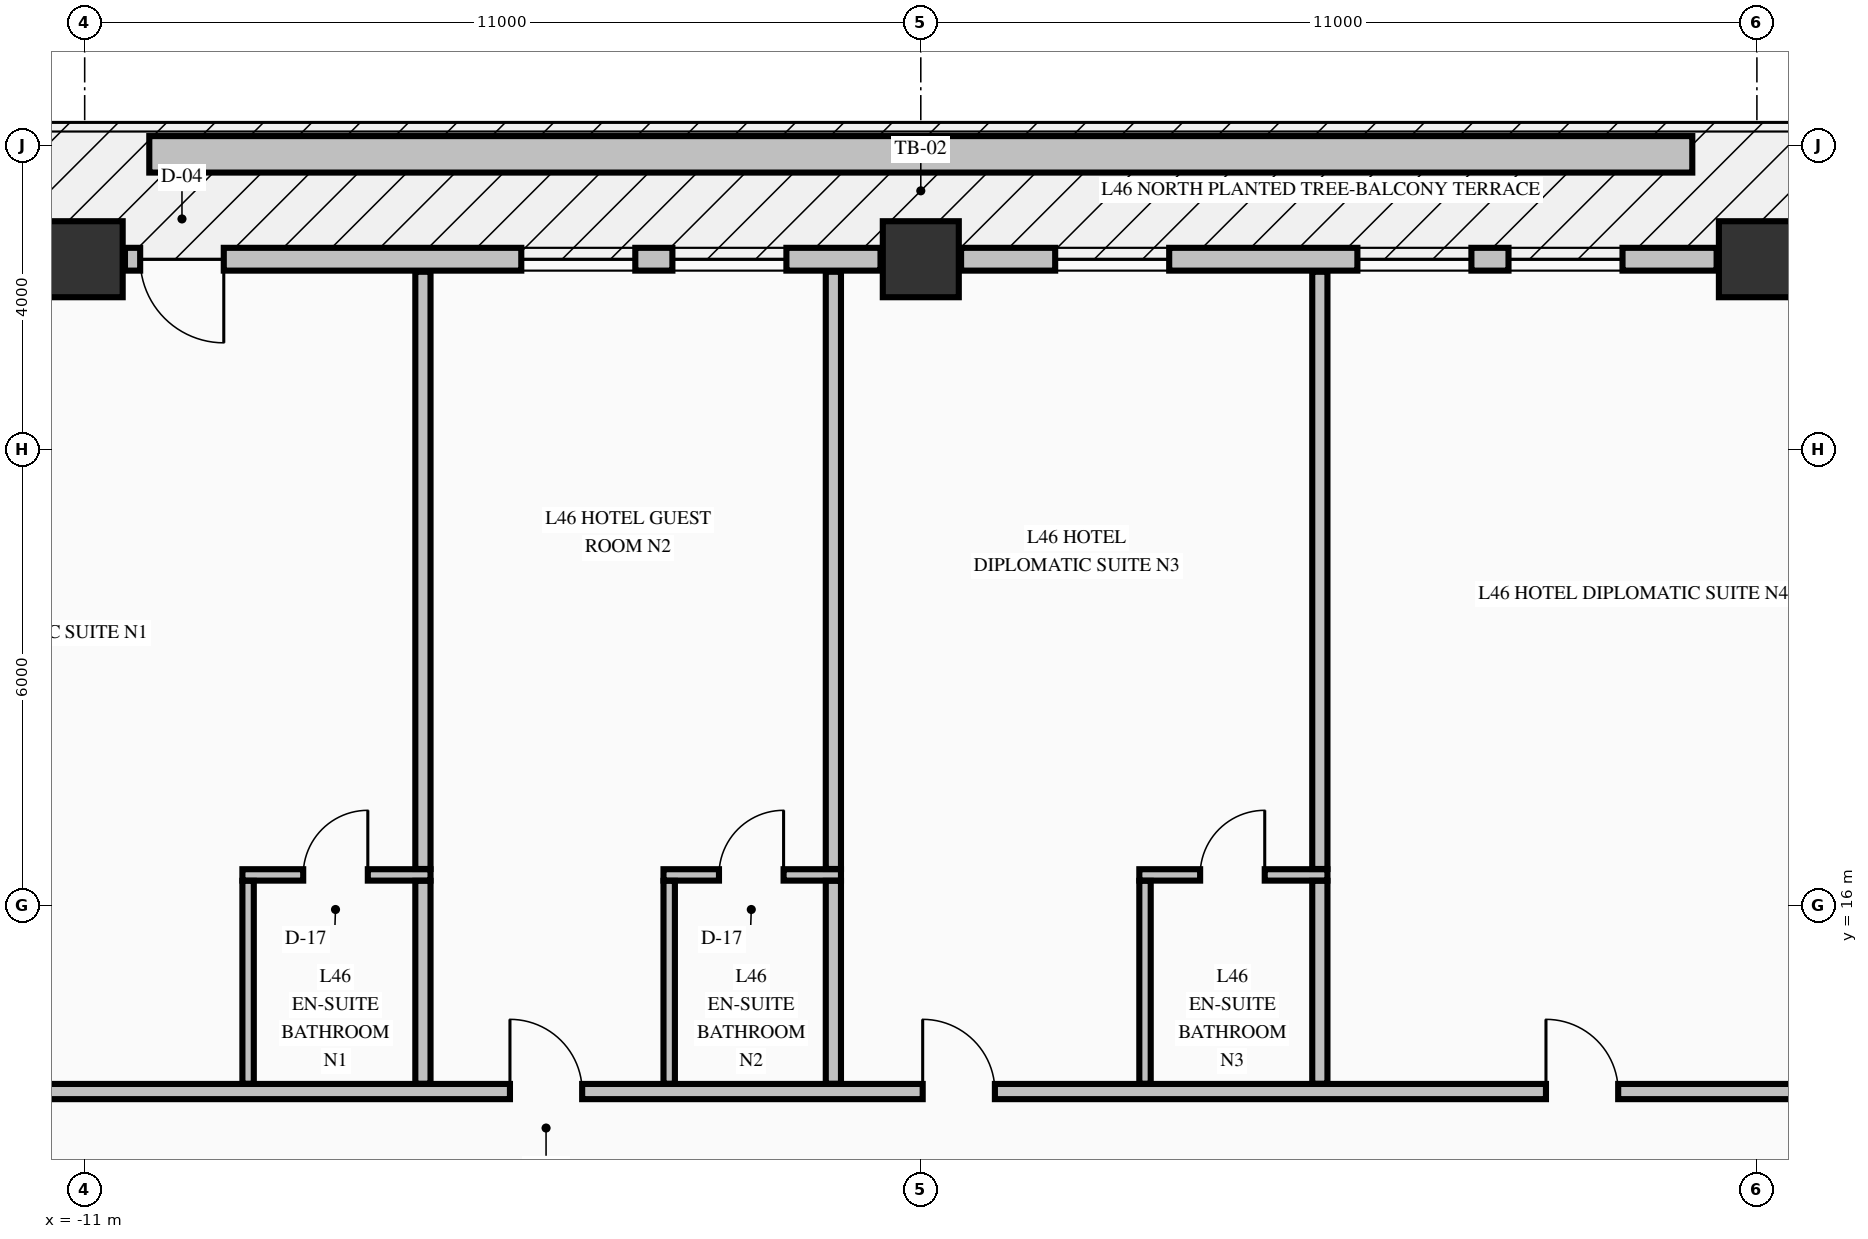
"""IFC4 building model, lengths in metres.
Left out: names, types, materials, properties, quantities, classifications, styles, units other than length and angle.
Written with IfcOpenShell. Run it as: python <this file> out.ifc"""

import sys

from ifc_helpers import new_model, si_unit, direction, frame, frame_2d, origin, origin_2d, place, context, subcontext, project, spatial, rectangle, extrude, element, fill, save


model = new_model("IFC4")
c1 = context("Model", 3, precision=1e-05, world=origin(), true_north=direction((0.0, 1.0)))
c2 = subcontext(c1, "Body", "Model", "MODEL_VIEW")
j1 = project(units=[si_unit("LENGTHUNIT", "METRE"), si_unit("PLANEANGLEUNIT", "RADIAN")], contexts=[c1])
p1 = place(None, origin())
s1 = spatial("IfcSite", under=j1, at=p1, CompositionType="ELEMENT")
p2 = place(p1, origin())
s2 = spatial("IfcBuilding", under=s1, at=p2, CompositionType="ELEMENT")
p3 = place(p2, frame((0.0, 0.0, 179.66)))
s3 = spatial("IfcBuildingStorey", under=s2, at=p3, CompositionType="ELEMENT", Elevation=179.66)
for number, where, z_axis, x_axis in (
    (1, (-11.0, 24.5, -0.25), (0.0, 0.0, 1.0), (1.0, 0.0, 0.0)),
    (2, (0.0, 24.5, -0.25), (0.0, 0.0, 1.0), (1.0, 0.0, 0.0)),
    (3, (11.0, 24.5, -0.25), (0.0, 0.0, 1.0), (1.0, 0.0, 0.0)),
):
    element("IfcColumn", number, at=place(p3, frame(where, z_axis=z_axis, x_axis=x_axis)), inside=s3, PredefinedType="COLUMN", context=c2, shape_type="SweptSolid", body=[
        extrude(rectangle(XDim=1.0, YDim=1.0, at=origin_2d()), origin(), (0.0, 0.0, 1.0), 3.4),
    ])
p4 = place(p3, frame((-0.53, 24.5, 0.0), z_axis=(0.0, 0.0, 1.0), x_axis=(-1.0, 0.0, 0.0)))
e4 = element("IfcWall", 4, at=p4, inside=s3, PredefinedType="STANDARD", context=c2, shape_type="SweptSolid", body=[
    extrude(rectangle(XDim=9.94, YDim=0.3, at=frame_2d((4.97, 0.0))), origin(), (0.0, 0.0, 1.0), 2.542),
])
p5 = place(p4, frame((8.64, 0.0, 0.0)))
e5 = element("IfcOpeningElement", 5, at=p5, cuts=e4, PredefinedType="OPENING", context=c2, shape_type="SweptSolid", body=[
    extrude(rectangle(XDim=1.1, YDim=2.15, at=frame_2d((0.55, 1.075))), frame((0.0, 0.16, 0.0), z_axis=(0.0, -1.0, 0.0), x_axis=(1.0, 0.0, 0.0)), (0.0, 0.0, 1.0), 0.32),
])
p6 = place(p4, frame((1.238, 0.0, 0.72)))
e6 = element("IfcOpeningElement", 6, at=p6, cuts=e4, PredefinedType="OPENING", context=c2, shape_type="SweptSolid", body=[
    extrude(rectangle(XDim=1.5, YDim=1.6, at=frame_2d((0.75, 0.8))), frame((0.0, 0.16, 0.0), z_axis=(0.0, -1.0, 0.0), x_axis=(1.0, 0.0, 0.0)), (0.0, 0.0, 1.0), 0.32),
])
p7 = place(p4, frame((3.226, 0.0, 0.72)))
e7 = element("IfcOpeningElement", 7, at=p7, cuts=e4, PredefinedType="OPENING", context=c2, shape_type="SweptSolid", body=[
    extrude(rectangle(XDim=1.5, YDim=1.6, at=frame_2d((0.75, 0.8))), frame((0.0, 0.16, 0.0), z_axis=(0.0, -1.0, 0.0), x_axis=(1.0, 0.0, 0.0)), (0.0, 0.0, 1.0), 0.32),
])
p8 = place(p3, frame((10.47, 24.5, 0.0), z_axis=(0.0, 0.0, 1.0), x_axis=(-1.0, 0.0, 0.0)))
e8 = element("IfcWall", 8, at=p8, inside=s3, PredefinedType="STANDARD", context=c2, shape_type="SweptSolid", body=[
    extrude(rectangle(XDim=9.94, YDim=0.3, at=frame_2d((4.97, 0.0))), origin(), (0.0, 0.0, 1.0), 2.542),
])
p9 = place(p8, frame((1.238, 0.0, 0.72)))
e9 = element("IfcOpeningElement", 9, at=p9, cuts=e8, PredefinedType="OPENING", context=c2, shape_type="SweptSolid", body=[
    extrude(rectangle(XDim=1.5, YDim=1.6, at=frame_2d((0.75, 0.8))), frame((0.0, 0.16, 0.0), z_axis=(0.0, -1.0, 0.0), x_axis=(1.0, 0.0, 0.0)), (0.0, 0.0, 1.0), 0.32),
])
p10 = place(p8, frame((3.226, 0.0, 0.72)))
e10 = element("IfcOpeningElement", 10, at=p10, cuts=e8, PredefinedType="OPENING", context=c2, shape_type="SweptSolid", body=[
    extrude(rectangle(XDim=1.5, YDim=1.6, at=frame_2d((0.75, 0.8))), frame((0.0, 0.16, 0.0), z_axis=(0.0, -1.0, 0.0), x_axis=(1.0, 0.0, 0.0)), (0.0, 0.0, 1.0), 0.32),
])
p11 = place(p8, frame((7.202, 0.0, 0.72)))
e11 = element("IfcOpeningElement", 11, at=p11, cuts=e8, PredefinedType="OPENING", context=c2, shape_type="SweptSolid", body=[
    extrude(rectangle(XDim=1.5, YDim=1.6, at=frame_2d((0.75, 0.8))), frame((0.0, 0.16, 0.0), z_axis=(0.0, -1.0, 0.0), x_axis=(1.0, 0.0, 0.0)), (0.0, 0.0, 1.0), 0.32),
])
p12 = place(p3, frame((-17.1, 13.55, 0.0), z_axis=(0.0, 0.0, 1.0), x_axis=(1.0, 0.0, 0.0)))
e12 = element("IfcWall", 12, at=p12, inside=s3, PredefinedType="PARTITIONING", context=c2, shape_type="SweptSolid", body=[
    extrude(rectangle(XDim=39.2, YDim=0.2, at=frame_2d((19.6, 0.0))), origin(), (0.0, 0.0, 1.0), 3.15),
])
p13 = place(p12, frame((3.695, 0.0, 0.0)))
e13 = element("IfcOpeningElement", 13, at=p13, cuts=e12, PredefinedType="OPENING", context=c2, shape_type="SweptSolid", body=[
    extrude(rectangle(XDim=0.95, YDim=2.15, at=frame_2d((0.475, 1.075))), frame((0.0, 0.11, 0.0), z_axis=(0.0, -1.0, 0.0), x_axis=(1.0, 0.0, 0.0)), (0.0, 0.0, 1.0), 0.22),
])
p14 = place(p12, frame((11.695, 0.0, 0.0)))
e14 = element("IfcOpeningElement", 14, at=p14, cuts=e12, PredefinedType="OPENING", context=c2, shape_type="SweptSolid", body=[
    extrude(rectangle(XDim=0.95, YDim=2.15, at=frame_2d((0.475, 1.075))), frame((0.0, 0.11, 0.0), z_axis=(0.0, -1.0, 0.0), x_axis=(1.0, 0.0, 0.0)), (0.0, 0.0, 1.0), 0.22),
])
p15 = place(p12, frame((17.125, 0.0, 0.0)))
e15 = element("IfcOpeningElement", 15, at=p15, cuts=e12, PredefinedType="OPENING", context=c2, shape_type="SweptSolid", body=[
    extrude(rectangle(XDim=0.95, YDim=2.15, at=frame_2d((0.475, 1.075))), frame((0.0, 0.11, 0.0), z_axis=(0.0, -1.0, 0.0), x_axis=(1.0, 0.0, 0.0)), (0.0, 0.0, 1.0), 0.22),
])
p16 = place(p12, frame((25.325, 0.0, 0.0)))
e16 = element("IfcOpeningElement", 16, at=p16, cuts=e12, PredefinedType="OPENING", context=c2, shape_type="SweptSolid", body=[
    extrude(rectangle(XDim=0.95, YDim=2.15, at=frame_2d((0.475, 1.075))), frame((0.0, 0.11, 0.0), z_axis=(0.0, -1.0, 0.0), x_axis=(1.0, 0.0, 0.0)), (0.0, 0.0, 1.0), 0.22),
])
p17 = place(p12, frame((33.695, 0.0, 0.0)))
e17 = element("IfcOpeningElement", 17, at=p17, cuts=e12, PredefinedType="OPENING", context=c2, shape_type="SweptSolid", body=[
    extrude(rectangle(XDim=0.95, YDim=2.15, at=frame_2d((0.475, 1.075))), frame((0.0, 0.11, 0.0), z_axis=(0.0, -1.0, 0.0), x_axis=(1.0, 0.0, 0.0)), (0.0, 0.0, 1.0), 0.22),
])
p18 = place(p3, frame((-8.925, 16.4, 0.0), z_axis=(0.0, 0.0, 1.0), x_axis=(1.0, 0.0, 0.0)))
e18 = element("IfcWall", 18, at=p18, inside=s3, PredefinedType="PARTITIONING", context=c2, shape_type="SweptSolid", body=[
    extrude(rectangle(XDim=2.475, YDim=0.15, at=frame_2d((1.238, 0.0))), origin(), (0.0, 0.0, 1.0), 3.15),
])
p19 = place(p18, frame((0.8, 0.0, 0.0)))
e19 = element("IfcOpeningElement", 19, at=p19, cuts=e18, PredefinedType="OPENING", context=c2, shape_type="SweptSolid", body=[
    extrude(rectangle(XDim=0.85, YDim=2.1, at=frame_2d((0.425, 1.05))), frame((0.0, 0.085, 0.0), z_axis=(0.0, -1.0, 0.0), x_axis=(1.0, 0.0, 0.0)), (0.0, 0.0, 1.0), 0.17),
])
p20 = place(p3, frame((-3.385, 16.4, 0.0), z_axis=(0.0, 0.0, 1.0), x_axis=(1.0, 0.0, 0.0)))
e20 = element("IfcWall", 20, at=p20, inside=s3, PredefinedType="PARTITIONING", context=c2, shape_type="SweptSolid", body=[
    extrude(rectangle(XDim=2.335, YDim=0.15, at=frame_2d((1.167, 0.0))), origin(), (0.0, 0.0, 1.0), 3.15),
])
p21 = place(p20, frame((0.73, 0.0, 0.0)))
e21 = element("IfcOpeningElement", 21, at=p21, cuts=e20, PredefinedType="OPENING", context=c2, shape_type="SweptSolid", body=[
    extrude(rectangle(XDim=0.85, YDim=2.1, at=frame_2d((0.425, 1.05))), frame((0.0, 0.085, 0.0), z_axis=(0.0, -1.0, 0.0), x_axis=(1.0, 0.0, 0.0)), (0.0, 0.0, 1.0), 0.17),
])
p22 = place(p3, frame((2.875, 16.4, 0.0), z_axis=(0.0, 0.0, 1.0), x_axis=(1.0, 0.0, 0.0)))
e22 = element("IfcWall", 22, at=p22, inside=s3, PredefinedType="PARTITIONING", context=c2, shape_type="SweptSolid", body=[
    extrude(rectangle(XDim=2.475, YDim=0.15, at=frame_2d((1.238, 0.0))), origin(), (0.0, 0.0, 1.0), 3.15),
])
p23 = place(p22, frame((0.8, 0.0, 0.0)))
e23 = element("IfcOpeningElement", 23, at=p23, cuts=e22, PredefinedType="OPENING", context=c2, shape_type="SweptSolid", body=[
    extrude(rectangle(XDim=0.85, YDim=2.1, at=frame_2d((0.425, 1.05))), frame((0.0, 0.085, 0.0), z_axis=(0.0, -1.0, 0.0), x_axis=(1.0, 0.0, 0.0)), (0.0, 0.0, 1.0), 0.17),
])
p24 = place(p3, frame((-8.85, 13.653, 0.0), z_axis=(0.0, 0.0, 1.0), x_axis=(0.0, 1.0, 0.0)))
e24 = element("IfcWall", 24, at=p24, inside=s3, PredefinedType="PARTITIONING", context=c2, shape_type="SweptSolid", body=[
    extrude(rectangle(XDim=2.669, YDim=0.15, at=frame_2d((1.334, 0.0))), origin(), (0.0, 0.0, 1.0), 3.15),
])
p25 = place(p3, frame((-6.55, 13.653, 0.0), z_axis=(0.0, 0.0, 1.0), x_axis=(0.0, 1.0, 0.0)))
e25 = element("IfcWall", 25, at=p25, inside=s3, PredefinedType="PARTITIONING", context=c2, shape_type="SweptSolid", body=[
    extrude(rectangle(XDim=2.669, YDim=0.2, at=frame_2d((1.334, 0.0))), origin(), (0.0, 0.0, 1.0), 3.15),
])
p26 = place(p3, frame((-6.55, 16.478, 0.0), z_axis=(0.0, 0.0, 1.0), x_axis=(0.0, 1.0, 0.0)))
e26 = element("IfcWall", 26, at=p26, inside=s3, PredefinedType="PARTITIONING", context=c2, shape_type="SweptSolid", body=[
    extrude(rectangle(XDim=7.857, YDim=0.2, at=frame_2d((3.928, 0.0))), origin(), (0.0, 0.0, 1.0), 3.15),
])
p27 = place(p3, frame((-3.31, 13.653, 0.0), z_axis=(0.0, 0.0, 1.0), x_axis=(0.0, 1.0, 0.0)))
e27 = element("IfcWall", 27, at=p27, inside=s3, PredefinedType="PARTITIONING", context=c2, shape_type="SweptSolid", body=[
    extrude(rectangle(XDim=2.669, YDim=0.15, at=frame_2d((1.334, 0.0))), origin(), (0.0, 0.0, 1.0), 3.15),
])
p28 = place(p3, frame((-1.15, 13.653, 0.0), z_axis=(0.0, 0.0, 1.0), x_axis=(0.0, 1.0, 0.0)))
e28 = element("IfcWall", 28, at=p28, inside=s3, PredefinedType="PARTITIONING", context=c2, shape_type="SweptSolid", body=[
    extrude(rectangle(XDim=2.669, YDim=0.2, at=frame_2d((1.334, 0.0))), origin(), (0.0, 0.0, 1.0), 3.15),
])
p29 = place(p3, frame((-1.15, 16.478, 0.0), z_axis=(0.0, 0.0, 1.0), x_axis=(0.0, 1.0, 0.0)))
e29 = element("IfcWall", 29, at=p29, inside=s3, PredefinedType="PARTITIONING", context=c2, shape_type="SweptSolid", body=[
    extrude(rectangle(XDim=7.857, YDim=0.2, at=frame_2d((3.928, 0.0))), origin(), (0.0, 0.0, 1.0), 3.15),
])
p30 = place(p3, frame((2.95, 13.653, 0.0), z_axis=(0.0, 0.0, 1.0), x_axis=(0.0, 1.0, 0.0)))
e30 = element("IfcWall", 30, at=p30, inside=s3, PredefinedType="PARTITIONING", context=c2, shape_type="SweptSolid", body=[
    extrude(rectangle(XDim=2.669, YDim=0.15, at=frame_2d((1.334, 0.0))), origin(), (0.0, 0.0, 1.0), 3.15),
])
p31 = place(p3, frame((5.25, 13.653, 0.0), z_axis=(0.0, 0.0, 1.0), x_axis=(0.0, 1.0, 0.0)))
e31 = element("IfcWall", 31, at=p31, inside=s3, PredefinedType="PARTITIONING", context=c2, shape_type="SweptSolid", body=[
    extrude(rectangle(XDim=2.669, YDim=0.2, at=frame_2d((1.334, 0.0))), origin(), (0.0, 0.0, 1.0), 3.15),
])
p32 = place(p3, frame((5.25, 16.478, 0.0), z_axis=(0.0, 0.0, 1.0), x_axis=(0.0, 1.0, 0.0)))
e32 = element("IfcWall", 32, at=p32, inside=s3, PredefinedType="PARTITIONING", context=c2, shape_type="SweptSolid", body=[
    extrude(rectangle(XDim=7.857, YDim=0.2, at=frame_2d((3.928, 0.0))), origin(), (0.0, 0.0, 1.0), 3.15),
])
p33 = place(p3, frame((-10.15, 25.88, -0.04), z_axis=(0.0, 0.0, 1.0), x_axis=(1.0, 0.0, 0.0)))
e33 = element("IfcWall", 33, at=p33, inside=s3, PredefinedType="PARAPET", context=c2, shape_type="SweptSolid", body=[
    extrude(rectangle(XDim=20.3, YDim=0.48, at=frame_2d((10.15, 0.0))), origin(), (0.0, 0.0, 1.0), 0.52),
])
p34 = place(p5, origin())
e34 = element("IfcDoor", 34, at=p34, inside=s3, OperationType="SINGLE_SWING_LEFT", PredefinedType="DOOR", context=c2, shape_type="SweptSolid", body=[
    extrude(rectangle(XDim=1.1, YDim=2.15, at=frame_2d((0.55, 1.075))), frame((0.0, 0.025, 0.0), z_axis=(0.0, -1.0, 0.0), x_axis=(1.0, 0.0, 0.0)), (0.0, 0.0, 1.0), 0.05),
])
fill(e5, e34)
p35 = place(p6, origin())
e35 = element("IfcWindow", 35, at=p35, inside=s3, PartitioningType="SINGLE_PANEL", PredefinedType="WINDOW", context=c2, shape_type="SweptSolid", body=[
    extrude(rectangle(XDim=1.5, YDim=1.6, at=frame_2d((0.75, 0.8))), frame((0.0, 0.03, 0.0), z_axis=(0.0, -1.0, 0.0), x_axis=(1.0, 0.0, 0.0)), (0.0, 0.0, 1.0), 0.06),
])
fill(e6, e35)
p36 = place(p7, origin())
e36 = element("IfcWindow", 36, at=p36, inside=s3, PartitioningType="SINGLE_PANEL", PredefinedType="WINDOW", context=c2, shape_type="SweptSolid", body=[
    extrude(rectangle(XDim=1.5, YDim=1.6, at=frame_2d((0.75, 0.8))), frame((0.0, 0.03, 0.0), z_axis=(0.0, -1.0, 0.0), x_axis=(1.0, 0.0, 0.0)), (0.0, 0.0, 1.0), 0.06),
])
fill(e7, e36)
p37 = place(p9, origin())
e37 = element("IfcWindow", 37, at=p37, inside=s3, PartitioningType="SINGLE_PANEL", PredefinedType="WINDOW", context=c2, shape_type="SweptSolid", body=[
    extrude(rectangle(XDim=1.5, YDim=1.6, at=frame_2d((0.75, 0.8))), frame((0.0, 0.03, 0.0), z_axis=(0.0, -1.0, 0.0), x_axis=(1.0, 0.0, 0.0)), (0.0, 0.0, 1.0), 0.06),
])
fill(e9, e37)
p38 = place(p10, origin())
e38 = element("IfcWindow", 38, at=p38, inside=s3, PartitioningType="SINGLE_PANEL", PredefinedType="WINDOW", context=c2, shape_type="SweptSolid", body=[
    extrude(rectangle(XDim=1.5, YDim=1.6, at=frame_2d((0.75, 0.8))), frame((0.0, 0.03, 0.0), z_axis=(0.0, -1.0, 0.0), x_axis=(1.0, 0.0, 0.0)), (0.0, 0.0, 1.0), 0.06),
])
fill(e10, e38)
p39 = place(p11, origin())
e39 = element("IfcWindow", 39, at=p39, inside=s3, PartitioningType="SINGLE_PANEL", PredefinedType="WINDOW", context=c2, shape_type="SweptSolid", body=[
    extrude(rectangle(XDim=1.5, YDim=1.6, at=frame_2d((0.75, 0.8))), frame((0.0, 0.03, 0.0), z_axis=(0.0, -1.0, 0.0), x_axis=(1.0, 0.0, 0.0)), (0.0, 0.0, 1.0), 0.06),
])
fill(e11, e39)
p40 = place(p19, origin())
e40 = element("IfcDoor", 40, at=p40, inside=s3, OperationType="SINGLE_SWING_RIGHT", PredefinedType="DOOR", context=c2, shape_type="SweptSolid", body=[
    extrude(rectangle(XDim=0.85, YDim=2.1, at=frame_2d((0.425, 1.05))), frame((0.0, 0.025, 0.0), z_axis=(0.0, -1.0, 0.0), x_axis=(1.0, 0.0, 0.0)), (0.0, 0.0, 1.0), 0.05),
])
fill(e19, e40)
p41 = place(p14, origin())
e41 = element("IfcDoor", 41, at=p41, inside=s3, OperationType="SINGLE_SWING_LEFT", PredefinedType="DOOR", context=c2, shape_type="SweptSolid", body=[
    extrude(rectangle(XDim=0.95, YDim=2.15, at=frame_2d((0.475, 1.075))), frame((0.0, 0.025, 0.0), z_axis=(0.0, -1.0, 0.0), x_axis=(1.0, 0.0, 0.0)), (0.0, 0.0, 1.0), 0.05),
])
fill(e14, e41)
p42 = place(p21, origin())
e42 = element("IfcDoor", 42, at=p42, inside=s3, OperationType="SINGLE_SWING_RIGHT", PredefinedType="DOOR", context=c2, shape_type="SweptSolid", body=[
    extrude(rectangle(XDim=0.85, YDim=2.1, at=frame_2d((0.425, 1.05))), frame((0.0, 0.025, 0.0), z_axis=(0.0, -1.0, 0.0), x_axis=(1.0, 0.0, 0.0)), (0.0, 0.0, 1.0), 0.05),
])
fill(e21, e42)
p43 = place(p15, origin())
e43 = element("IfcDoor", 43, at=p43, inside=s3, OperationType="SINGLE_SWING_LEFT", PredefinedType="DOOR", context=c2, shape_type="SweptSolid", body=[
    extrude(rectangle(XDim=0.95, YDim=2.15, at=frame_2d((0.475, 1.075))), frame((0.0, 0.025, 0.0), z_axis=(0.0, -1.0, 0.0), x_axis=(1.0, 0.0, 0.0)), (0.0, 0.0, 1.0), 0.05),
])
fill(e15, e43)
p44 = place(p23, origin())
e44 = element("IfcDoor", 44, at=p44, inside=s3, OperationType="SINGLE_SWING_RIGHT", PredefinedType="DOOR", context=c2, shape_type="SweptSolid", body=[
    extrude(rectangle(XDim=0.85, YDim=2.1, at=frame_2d((0.425, 1.05))), frame((0.0, 0.025, 0.0), z_axis=(0.0, -1.0, 0.0), x_axis=(1.0, 0.0, 0.0)), (0.0, 0.0, 1.0), 0.05),
])
fill(e23, e44)
p45 = place(p16, origin())
e45 = element("IfcDoor", 45, at=p45, inside=s3, OperationType="SINGLE_SWING_LEFT", PredefinedType="DOOR", context=c2, shape_type="SweptSolid", body=[
    extrude(rectangle(XDim=0.95, YDim=2.15, at=frame_2d((0.475, 1.075))), frame((0.0, 0.025, 0.0), z_axis=(0.0, -1.0, 0.0), x_axis=(1.0, 0.0, 0.0)), (0.0, 0.0, 1.0), 0.05),
])
fill(e16, e45)
save(model, sys.argv[1])
